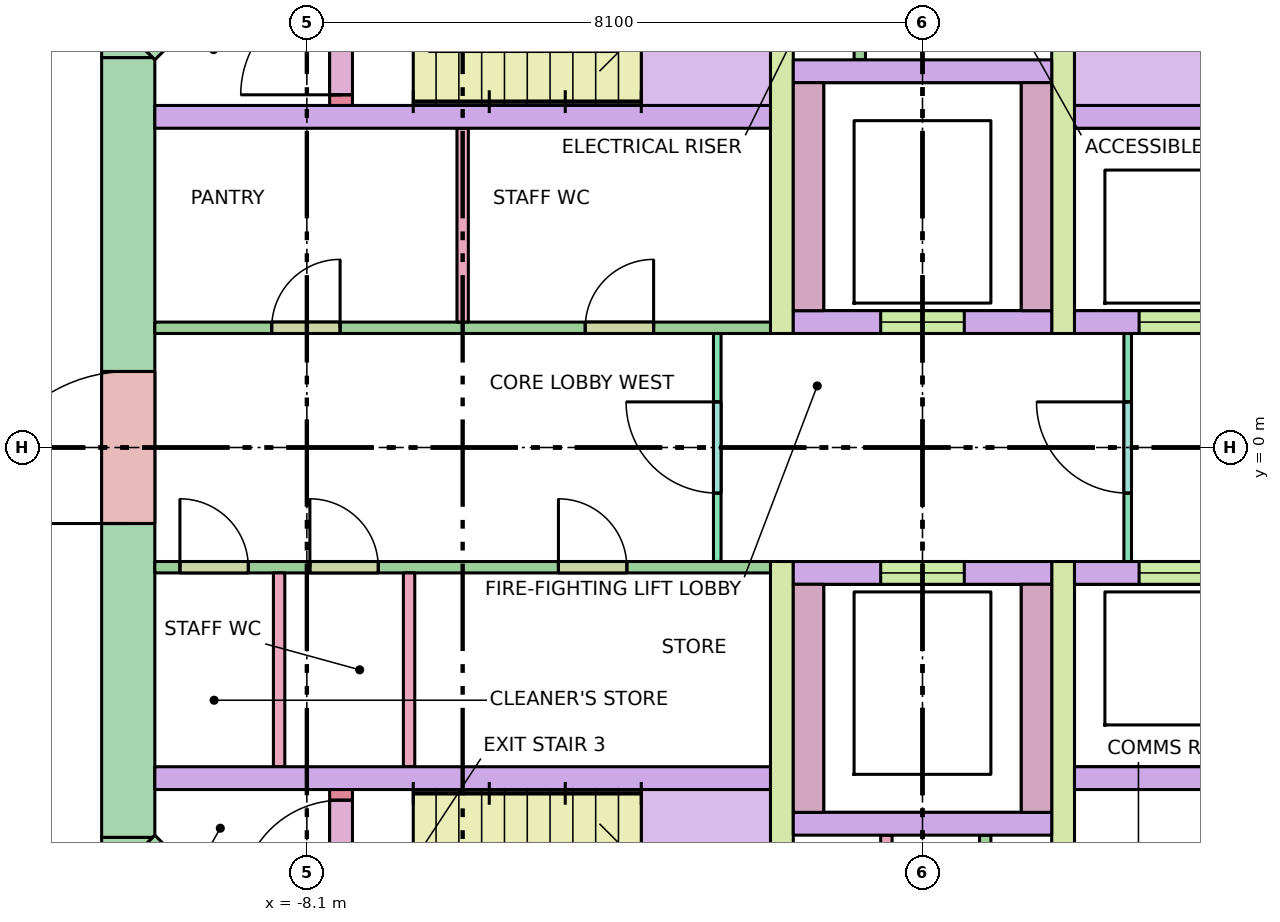
"""IFC4 building model, lengths in metres.
Left out: names, types, materials, properties, quantities, classifications, styles, units other than length and angle.
Written with IfcOpenShell. Run it as: python <this file> out.ifc"""

import sys

from ifc_helpers import new_model, si_unit, direction, frame, frame_2d, origin, place, context, subcontext, project, spatial, polyline, rectangle, outline, extrude, element, fill, save


model = new_model("IFC4")
c1 = context("Model", 3, precision=1e-05, world=origin(), true_north=direction((0.0, 1.0)))
c2 = subcontext(c1, "Body", "Model", "MODEL_VIEW")
j1 = project(units=[si_unit("LENGTHUNIT", "METRE"), si_unit("PLANEANGLEUNIT", "RADIAN")], contexts=[c1])
p1 = place(None, origin())
s1 = spatial("IfcSite", under=j1, at=p1, CompositionType="ELEMENT")
p2 = place(p1, origin())
s2 = spatial("IfcBuilding", under=s1, at=p2, CompositionType="ELEMENT")
p3 = place(p2, frame((0.0, 0.0, 211.3)))
s3 = spatial("IfcBuildingStorey", under=s2, at=p3, CompositionType="ELEMENT", Elevation=211.3)
p4 = place(p3, frame((-10.45, -5.13, -0.28), z_axis=(0.0, 0.0, 1.0), x_axis=(0.0, 1.0, 0.0)))
e1 = element("IfcWall", 1, at=p4, inside=s3, PredefinedType="SHEAR", context=c2, shape_type="SweptSolid", body=[
    extrude(rectangle(XDim=10.26, YDim=0.7, at=frame_2d((5.13, 0.0))), origin(), (0.0, 0.0, 1.0), 3.7),
])
p5 = place(p4, frame((4.13, 0.0, 0.28)))
e2 = element("IfcOpeningElement", 2, at=p5, cuts=e1, PredefinedType="OPENING", context=c2, shape_type="SweptSolid", body=[
    extrude(rectangle(XDim=2.0, YDim=2.1, at=frame_2d((1.0, 1.05))), frame((0.0, 0.36, 0.0), z_axis=(0.0, -1.0, 0.0), x_axis=(1.0, 0.0, 0.0)), (0.0, 0.0, 1.0), 0.72),
])
p6 = place(p3, frame((-10.347, 5.347, -0.28), z_axis=(0.0, 0.0, 1.0), x_axis=(0.707106781187, 0.707106781187, 0.0)))
e3 = element("IfcWall", 3, at=p6, inside=s3, PredefinedType="SHEAR", context=c2, shape_type="SweptSolid", body=[
    extrude(rectangle(XDim=4.243, YDim=0.7, at=frame_2d((2.121, 0.0))), origin(), (0.0, 0.0, 1.0), 3.7),
])
p7 = place(p6, frame((0.65, 0.0, 0.28)))
e4 = element("IfcOpeningElement", 4, at=p7, cuts=e3, PredefinedType="OPENING", context=c2, shape_type="SweptSolid", body=[
    extrude(rectangle(XDim=1.2, YDim=2.1, at=frame_2d((0.6, 1.05))), frame((0.0, 0.36, 0.0), z_axis=(0.0, -1.0, 0.0), x_axis=(1.0, 0.0, 0.0)), (0.0, 0.0, 1.0), 0.72),
])
p8 = place(p3, frame((-7.347, -8.347, -0.28), z_axis=(0.0, 0.0, 1.0), x_axis=(-0.707106781187, 0.707106781187, 0.0)))
e5 = element("IfcWall", 5, at=p8, inside=s3, PredefinedType="SHEAR", context=c2, shape_type="SweptSolid", body=[
    extrude(rectangle(XDim=4.243, YDim=0.7, at=frame_2d((2.121, 0.0))), origin(), (0.0, 0.0, 1.0), 3.7),
])
p9 = place(p8, frame((2.393, 0.0, 0.28)))
e6 = element("IfcOpeningElement", 6, at=p9, cuts=e5, PredefinedType="OPENING", context=c2, shape_type="SweptSolid", body=[
    extrude(rectangle(XDim=1.2, YDim=2.1, at=frame_2d((0.6, 1.05))), frame((0.0, 0.36, 0.0), z_axis=(0.0, -1.0, 0.0), x_axis=(1.0, 0.0, 0.0)), (0.0, 0.0, 1.0), 0.72),
])
p10 = place(p3, frame((0.0, 0.0, -0.28)))
e7 = element("IfcWall", 7, at=p10, inside=s3, PredefinedType="SHEAR", context=c2, shape_type="SweptSolid", body=[
    extrude(outline(polyline([(-10.8, -5.39), (-10.8, -5.13), (-10.8, -5.13), (-10.13, -5.13), (-10.595, -5.595), (-10.595, -5.595), (-10.595, -5.595), (-10.8, -5.39)])), origin(), (0.0, 0.0, 1.0), 3.7),
])
p11 = place(p3, frame((0.0, 0.0, -0.28)))
e8 = element("IfcWall", 8, at=p11, inside=s3, PredefinedType="SHEAR", context=c2, shape_type="SweptSolid", body=[
    extrude(outline(polyline([(-10.595, 5.595), (-10.595, 5.595), (-10.595, 5.595), (-10.13, 5.13), (-10.8, 5.13), (-10.8, 5.13), (-10.8, 5.39), (-10.595, 5.595)])), origin(), (0.0, 0.0, 1.0), 3.7),
])
for number, where, z_axis, x_axis in (
    (9, (-10.1, 4.35, 0.0), (0.0, 0.0, 1.0), (1.0, 0.0, 0.0)),
    (10, (-10.1, -4.35, 0.0), (0.0, 0.0, 1.0), (1.0, 0.0, 0.0)),
    (11, (2.0, 4.35, 0.0), (0.0, 0.0, 1.0), (1.0, 0.0, 0.0)),
    (12, (2.0, -4.35, 0.0), (0.0, 0.0, 1.0), (1.0, 0.0, 0.0)),
):
    element("IfcWall", number, at=place(p3, frame(where, z_axis=z_axis, x_axis=x_axis)), inside=s3, PredefinedType="SOLIDWALL", context=c2, shape_type="SweptSolid", body=[
        extrude(rectangle(XDim=8.1, YDim=0.3, at=frame_2d((4.05, 0.0))), origin(), (0.0, 0.0, 1.0), 3.42),
    ])
p12 = place(p3, frame((2.0, 1.65, 0.0), z_axis=(0.0, 0.0, 1.0), x_axis=(1.0, 0.0, 0.0)))
e13 = element("IfcWall", 13, at=p12, inside=s3, PredefinedType="SOLIDWALL", context=c2, shape_type="SweptSolid", body=[
    extrude(rectangle(XDim=8.1, YDim=0.3, at=frame_2d((4.05, 0.0))), origin(), (0.0, 0.0, 1.0), 3.42),
])
p13 = place(p12, frame((0.85, 0.0, 0.0)))
e14 = element("IfcOpeningElement", 14, at=p13, cuts=e13, PredefinedType="OPENING", context=c2, shape_type="SweptSolid", body=[
    extrude(rectangle(XDim=1.1, YDim=2.1, at=frame_2d((0.55, 1.05))), frame((0.0, 0.16, 0.0), z_axis=(0.0, -1.0, 0.0), x_axis=(1.0, 0.0, 0.0)), (0.0, 0.0, 1.0), 0.32),
])
p14 = place(p12, frame((3.5, 0.0, 0.0)))
e15 = element("IfcOpeningElement", 15, at=p14, cuts=e13, PredefinedType="OPENING", context=c2, shape_type="SweptSolid", body=[
    extrude(rectangle(XDim=1.1, YDim=2.1, at=frame_2d((0.55, 1.05))), frame((0.0, 0.16, 0.0), z_axis=(0.0, -1.0, 0.0), x_axis=(1.0, 0.0, 0.0)), (0.0, 0.0, 1.0), 0.32),
])
p15 = place(p12, frame((6.3, 0.0, 0.0)))
e16 = element("IfcOpeningElement", 16, at=p15, cuts=e13, PredefinedType="OPENING", context=c2, shape_type="SweptSolid", body=[
    extrude(rectangle(XDim=1.1, YDim=2.1, at=frame_2d((0.55, 1.05))), frame((0.0, 0.16, 0.0), z_axis=(0.0, -1.0, 0.0), x_axis=(1.0, 0.0, 0.0)), (0.0, 0.0, 1.0), 0.32),
])
p16 = place(p3, frame((2.0, -1.65, 0.0), z_axis=(0.0, 0.0, 1.0), x_axis=(1.0, 0.0, 0.0)))
e17 = element("IfcWall", 17, at=p16, inside=s3, PredefinedType="SOLIDWALL", context=c2, shape_type="SweptSolid", body=[
    extrude(rectangle(XDim=8.1, YDim=0.3, at=frame_2d((4.05, 0.0))), origin(), (0.0, 0.0, 1.0), 3.42),
])
p17 = place(p16, frame((0.85, 0.0, 0.0)))
e18 = element("IfcOpeningElement", 18, at=p17, cuts=e17, PredefinedType="OPENING", context=c2, shape_type="SweptSolid", body=[
    extrude(rectangle(XDim=1.1, YDim=2.1, at=frame_2d((0.55, 1.05))), frame((0.0, 0.16, 0.0), z_axis=(0.0, -1.0, 0.0), x_axis=(1.0, 0.0, 0.0)), (0.0, 0.0, 1.0), 0.32),
])
p18 = place(p16, frame((3.5, 0.0, 0.0)))
e19 = element("IfcOpeningElement", 19, at=p18, cuts=e17, PredefinedType="OPENING", context=c2, shape_type="SweptSolid", body=[
    extrude(rectangle(XDim=1.1, YDim=2.1, at=frame_2d((0.55, 1.05))), frame((0.0, 0.16, 0.0), z_axis=(0.0, -1.0, 0.0), x_axis=(1.0, 0.0, 0.0)), (0.0, 0.0, 1.0), 0.32),
])
p19 = place(p16, frame((6.3, 0.0, 0.0)))
e20 = element("IfcOpeningElement", 20, at=p19, cuts=e17, PredefinedType="OPENING", context=c2, shape_type="SweptSolid", body=[
    extrude(rectangle(XDim=1.1, YDim=2.1, at=frame_2d((0.55, 1.05))), frame((0.0, 0.16, 0.0), z_axis=(0.0, -1.0, 0.0), x_axis=(1.0, 0.0, 0.0)), (0.0, 0.0, 1.0), 0.32),
])
for number, where, z_axis, x_axis in (
    (21, (-1.85, 1.5, 0.0), (0.0, 0.0, 1.0), (0.0, 1.0, 0.0)),
    (22, (-1.85, -8.1, 0.0), (0.0, 0.0, 1.0), (0.0, 1.0, 0.0)),
    (23, (1.85, 1.5, 0.0), (0.0, 0.0, 1.0), (0.0, 1.0, 0.0)),
    (24, (1.85, -8.1, 0.0), (0.0, 0.0, 1.0), (0.0, 1.0, 0.0)),
):
    element("IfcWall", number, at=place(p3, frame(where, z_axis=z_axis, x_axis=x_axis)), inside=s3, PredefinedType="SHEAR", context=c2, shape_type="SweptSolid", body=[
        extrude(rectangle(XDim=6.6, YDim=0.3, at=frame_2d((3.3, 0.0))), origin(), (0.0, 0.0, 1.0), 3.42),
    ])
p20 = place(p3, frame((-1.7, 1.65, 0.0), z_axis=(0.0, 0.0, 1.0), x_axis=(1.0, 0.0, 0.0)))
e25 = element("IfcWall", 25, at=p20, inside=s3, PredefinedType="SOLIDWALL", context=c2, shape_type="SweptSolid", body=[
    extrude(rectangle(XDim=3.4, YDim=0.3, at=frame_2d((1.7, 0.0))), origin(), (0.0, 0.0, 1.0), 3.42),
])
p21 = place(p20, frame((1.15, 0.0, 0.0)))
e26 = element("IfcOpeningElement", 26, at=p21, cuts=e25, PredefinedType="OPENING", context=c2, shape_type="SweptSolid", body=[
    extrude(rectangle(XDim=1.1, YDim=2.1, at=frame_2d((0.55, 1.05))), frame((0.0, 0.16, 0.0), z_axis=(0.0, -1.0, 0.0), x_axis=(1.0, 0.0, 0.0)), (0.0, 0.0, 1.0), 0.32),
])
p22 = place(p3, frame((-1.7, -1.65, 0.0), z_axis=(0.0, 0.0, 1.0), x_axis=(1.0, 0.0, 0.0)))
e27 = element("IfcWall", 27, at=p22, inside=s3, PredefinedType="SOLIDWALL", context=c2, shape_type="SweptSolid", body=[
    extrude(rectangle(XDim=3.4, YDim=0.3, at=frame_2d((1.7, 0.0))), origin(), (0.0, 0.0, 1.0), 3.42),
])
p23 = place(p22, frame((1.15, 0.0, 0.0)))
e28 = element("IfcOpeningElement", 28, at=p23, cuts=e27, PredefinedType="OPENING", context=c2, shape_type="SweptSolid", body=[
    extrude(rectangle(XDim=1.1, YDim=2.1, at=frame_2d((0.55, 1.05))), frame((0.0, 0.16, 0.0), z_axis=(0.0, -1.0, 0.0), x_axis=(1.0, 0.0, 0.0)), (0.0, 0.0, 1.0), 0.32),
])
for number, where, z_axis, x_axis in (
    (29, (-1.5, 1.8, 0.0), (0.0, 0.0, 1.0), (0.0, 1.0, 0.0)),
    (30, (-1.5, -4.8, 0.0), (0.0, 0.0, 1.0), (0.0, 1.0, 0.0)),
    (31, (1.5, 1.8, 0.0), (0.0, 0.0, 1.0), (0.0, 1.0, 0.0)),
    (32, (1.5, -4.8, 0.0), (0.0, 0.0, 1.0), (0.0, 1.0, 0.0)),
):
    element("IfcWall", number, at=place(p3, frame(where, z_axis=z_axis, x_axis=x_axis)), inside=s3, PredefinedType="SOLIDWALL", context=c2, shape_type="SweptSolid", body=[
        extrude(rectangle(XDim=3.0, YDim=0.4, at=frame_2d((1.5, 0.0))), origin(), (0.0, 0.0, 1.0), 3.42),
    ])
for number, where, z_axis, x_axis in (
    (33, (-1.7, 4.95, 0.0), (0.0, 0.0, 1.0), (1.0, 0.0, 0.0)),
    (34, (-1.7, -4.95, 0.0), (0.0, 0.0, 1.0), (1.0, 0.0, 0.0)),
):
    element("IfcWall", number, at=place(p3, frame(where, z_axis=z_axis, x_axis=x_axis)), inside=s3, PredefinedType="SOLIDWALL", context=c2, shape_type="SweptSolid", body=[
        extrude(rectangle(XDim=3.4, YDim=0.3, at=frame_2d((1.7, 0.0))), origin(), (0.0, 0.0, 1.0), 3.42),
    ])
p24 = place(p3, frame((-7.65, 4.5, 0.0), z_axis=(0.0, 0.0, 1.0), x_axis=(0.0, 1.0, 0.0)))
e35 = element("IfcWall", 35, at=p24, inside=s3, PredefinedType="SHEAR", context=c2, shape_type="SweptSolid", body=[
    extrude(rectangle(XDim=3.14, YDim=0.3, at=frame_2d((1.57, 0.0))), origin(), (0.0, 0.0, 1.0), 3.42),
])
p25 = place(p24, frame((0.14, 0.0, 0.0)))
e36 = element("IfcOpeningElement", 36, at=p25, cuts=e35, PredefinedType="OPENING", context=c2, shape_type="SweptSolid", body=[
    extrude(rectangle(XDim=1.32, YDim=2.1, at=frame_2d((0.66, 1.05))), frame((0.0, 0.16, 0.0), z_axis=(0.0, -1.0, 0.0), x_axis=(1.0, 0.0, 0.0)), (0.0, 0.0, 1.0), 0.32),
])
p26 = place(p3, frame((-7.65, -7.64, 0.0), z_axis=(0.0, 0.0, 1.0), x_axis=(0.0, 1.0, 0.0)))
e37 = element("IfcWall", 37, at=p26, inside=s3, PredefinedType="SHEAR", context=c2, shape_type="SweptSolid", body=[
    extrude(rectangle(XDim=3.14, YDim=0.3, at=frame_2d((1.57, 0.0))), origin(), (0.0, 0.0, 1.0), 3.42),
])
p27 = place(p26, frame((1.68, 0.0, 0.0)))
e38 = element("IfcOpeningElement", 38, at=p27, cuts=e37, PredefinedType="OPENING", context=c2, shape_type="SweptSolid", body=[
    extrude(rectangle(XDim=1.32, YDim=2.1, at=frame_2d((0.66, 1.05))), frame((0.0, 0.16, 0.0), z_axis=(0.0, -1.0, 0.0), x_axis=(1.0, 0.0, 0.0)), (0.0, 0.0, 1.0), 0.32),
])
p28 = place(p3, frame((-2.7, -1.5, 0.0), z_axis=(0.0, 0.0, 1.0), x_axis=(0.0, 1.0, 0.0)))
e39 = element("IfcWall", 39, at=p28, inside=s3, PredefinedType="PARTITIONING", context=c2, shape_type="SweptSolid", body=[
    extrude(rectangle(XDim=3.0, YDim=0.1, at=frame_2d((1.5, 0.0))), origin(), (0.0, 0.0, 1.0), 3.42),
])
p29 = place(p28, frame((0.9, 0.0, 0.0)))
e40 = element("IfcOpeningElement", 40, at=p29, cuts=e39, PredefinedType="OPENING", context=c2, shape_type="SweptSolid", body=[
    extrude(rectangle(XDim=1.2, YDim=2.1, at=frame_2d((0.6, 1.05))), frame((0.0, 0.06, 0.0), z_axis=(0.0, -1.0, 0.0), x_axis=(1.0, 0.0, 0.0)), (0.0, 0.0, 1.0), 0.12),
])
p30 = place(p3, frame((2.7, -1.5, 0.0), z_axis=(0.0, 0.0, 1.0), x_axis=(0.0, 1.0, 0.0)))
e41 = element("IfcWall", 41, at=p30, inside=s3, PredefinedType="PARTITIONING", context=c2, shape_type="SweptSolid", body=[
    extrude(rectangle(XDim=3.0, YDim=0.1, at=frame_2d((1.5, 0.0))), origin(), (0.0, 0.0, 1.0), 3.42),
])
p31 = place(p30, frame((0.9, 0.0, 0.0)))
e42 = element("IfcOpeningElement", 42, at=p31, cuts=e41, PredefinedType="OPENING", context=c2, shape_type="SweptSolid", body=[
    extrude(rectangle(XDim=1.2, YDim=2.1, at=frame_2d((0.6, 1.05))), frame((0.0, 0.06, 0.0), z_axis=(0.0, -1.0, 0.0), x_axis=(1.0, 0.0, 0.0)), (0.0, 0.0, 1.0), 0.12),
])
for number, where, z_axis, x_axis in (
    (43, (-0.825, 5.1, 0.0), (0.0, 0.0, 1.0), (0.0, 1.0, 0.0)),
    (44, (0.825, -8.1, 0.0), (0.0, 0.0, 1.0), (0.0, 1.0, 0.0)),
    (45, (-0.475, -8.1, 0.0), (0.0, 0.0, 1.0), (0.0, 1.0, 0.0)),
):
    element("IfcWall", number, at=place(p3, frame(where, z_axis=z_axis, x_axis=x_axis)), inside=s3, PredefinedType="PARTITIONING", context=c2, shape_type="SweptSolid", body=[
        extrude(rectangle(XDim=3.0, YDim=0.15, at=frame_2d((1.5, 0.0))), origin(), (0.0, 0.0, 1.0), 3.42),
    ])
for number, where, z_axis, x_axis in (
    (46, (-6.05, 1.65, 0.0), (0.0, 0.0, 1.0), (0.0, 1.0, 0.0)),
    (47, (-8.465, -4.2, 0.0), (0.0, 0.0, 1.0), (0.0, 1.0, 0.0)),
    (48, (-6.755, -4.2, 0.0), (0.0, 0.0, 1.0), (0.0, 1.0, 0.0)),
):
    element("IfcWall", number, at=place(p3, frame(where, z_axis=z_axis, x_axis=x_axis)), inside=s3, PredefinedType="PARTITIONING", context=c2, shape_type="SweptSolid", body=[
        extrude(rectangle(XDim=2.55, YDim=0.15, at=frame_2d((1.275, 0.0))), origin(), (0.0, 0.0, 1.0), 3.42),
    ])
p32 = place(p3, frame((-10.1, 1.575, 0.0), z_axis=(0.0, 0.0, 1.0), x_axis=(1.0, 0.0, 0.0)))
e49 = element("IfcWall", 49, at=p32, inside=s3, PredefinedType="PARTITIONING", context=c2, shape_type="SweptSolid", body=[
    extrude(rectangle(XDim=8.1, YDim=0.15, at=frame_2d((4.05, 0.0))), origin(), (0.0, 0.0, 1.0), 3.42),
])
p33 = place(p32, frame((1.538, 0.0, 0.0)))
e50 = element("IfcOpeningElement", 50, at=p33, cuts=e49, PredefinedType="OPENING", context=c2, shape_type="SweptSolid", body=[
    extrude(rectangle(XDim=0.9, YDim=2.1, at=frame_2d((0.45, 1.05))), frame((0.0, 0.085, 0.0), z_axis=(0.0, -1.0, 0.0), x_axis=(1.0, 0.0, 0.0)), (0.0, 0.0, 1.0), 0.17),
])
p34 = place(p32, frame((5.663, 0.0, 0.0)))
e51 = element("IfcOpeningElement", 51, at=p34, cuts=e49, PredefinedType="OPENING", context=c2, shape_type="SweptSolid", body=[
    extrude(rectangle(XDim=0.9, YDim=2.1, at=frame_2d((0.45, 1.05))), frame((0.0, 0.085, 0.0), z_axis=(0.0, -1.0, 0.0), x_axis=(1.0, 0.0, 0.0)), (0.0, 0.0, 1.0), 0.17),
])
p35 = place(p3, frame((-10.1, -1.575, 0.0), z_axis=(0.0, 0.0, 1.0), x_axis=(1.0, 0.0, 0.0)))
e52 = element("IfcWall", 52, at=p35, inside=s3, PredefinedType="PARTITIONING", context=c2, shape_type="SweptSolid", body=[
    extrude(rectangle(XDim=8.1, YDim=0.15, at=frame_2d((4.05, 0.0))), origin(), (0.0, 0.0, 1.0), 3.42),
])
p36 = place(p35, frame((0.33, 0.0, 0.0)))
e53 = element("IfcOpeningElement", 53, at=p36, cuts=e52, PredefinedType="OPENING", context=c2, shape_type="SweptSolid", body=[
    extrude(rectangle(XDim=0.9, YDim=2.1, at=frame_2d((0.45, 1.05))), frame((0.0, 0.085, 0.0), z_axis=(0.0, -1.0, 0.0), x_axis=(1.0, 0.0, 0.0)), (0.0, 0.0, 1.0), 0.17),
])
p37 = place(p35, frame((2.04, 0.0, 0.0)))
e54 = element("IfcOpeningElement", 54, at=p37, cuts=e52, PredefinedType="OPENING", context=c2, shape_type="SweptSolid", body=[
    extrude(rectangle(XDim=0.9, YDim=2.1, at=frame_2d((0.45, 1.05))), frame((0.0, 0.085, 0.0), z_axis=(0.0, -1.0, 0.0), x_axis=(1.0, 0.0, 0.0)), (0.0, 0.0, 1.0), 0.17),
])
p38 = place(p35, frame((5.31, 0.0, 0.0)))
e55 = element("IfcOpeningElement", 55, at=p38, cuts=e52, PredefinedType="OPENING", context=c2, shape_type="SweptSolid", body=[
    extrude(rectangle(XDim=0.9, YDim=2.1, at=frame_2d((0.45, 1.05))), frame((0.0, 0.085, 0.0), z_axis=(0.0, -1.0, 0.0), x_axis=(1.0, 0.0, 0.0)), (0.0, 0.0, 1.0), 0.17),
])
p39 = place(p13, origin())
e56 = element("IfcDoor", 56, at=p39, inside=s3, OperationType="DOUBLE_DOOR_SLIDING", PredefinedType="DOOR", context=c2, shape_type="SweptSolid", body=[
    extrude(rectangle(XDim=1.1, YDim=2.1, at=frame_2d((0.55, 1.05))), frame((0.0, 0.025, 0.0), z_axis=(0.0, -1.0, 0.0), x_axis=(1.0, 0.0, 0.0)), (0.0, 0.0, 1.0), 0.05),
])
fill(e14, e56)
p40 = place(p17, origin())
e57 = element("IfcDoor", 57, at=p40, inside=s3, OperationType="DOUBLE_DOOR_SLIDING", PredefinedType="DOOR", context=c2, shape_type="SweptSolid", body=[
    extrude(rectangle(XDim=1.1, YDim=2.1, at=frame_2d((0.55, 1.05))), frame((0.0, 0.025, 0.0), z_axis=(0.0, -1.0, 0.0), x_axis=(1.0, 0.0, 0.0)), (0.0, 0.0, 1.0), 0.05),
])
fill(e18, e57)
p41 = place(p21, origin())
e58 = element("IfcDoor", 58, at=p41, inside=s3, OperationType="DOUBLE_DOOR_SLIDING", PredefinedType="DOOR", context=c2, shape_type="SweptSolid", body=[
    extrude(rectangle(XDim=1.1, YDim=2.1, at=frame_2d((0.55, 1.05))), frame((0.0, 0.025, 0.0), z_axis=(0.0, -1.0, 0.0), x_axis=(1.0, 0.0, 0.0)), (0.0, 0.0, 1.0), 0.05),
])
fill(e26, e58)
p42 = place(p23, origin())
e59 = element("IfcDoor", 59, at=p42, inside=s3, OperationType="DOUBLE_DOOR_SLIDING", PredefinedType="DOOR", context=c2, shape_type="SweptSolid", body=[
    extrude(rectangle(XDim=1.1, YDim=2.1, at=frame_2d((0.55, 1.05))), frame((0.0, 0.025, 0.0), z_axis=(0.0, -1.0, 0.0), x_axis=(1.0, 0.0, 0.0)), (0.0, 0.0, 1.0), 0.05),
])
fill(e28, e59)
p43 = place(p25, origin())
e60 = element("IfcDoor", 60, at=p43, inside=s3, OperationType="DOUBLE_DOOR_SINGLE_SWING", PredefinedType="DOOR", context=c2, shape_type="SweptSolid", body=[
    extrude(rectangle(XDim=1.32, YDim=2.1, at=frame_2d((0.66, 1.05))), frame((0.0, 0.025, 0.0), z_axis=(0.0, -1.0, 0.0), x_axis=(1.0, 0.0, 0.0)), (0.0, 0.0, 1.0), 0.05),
])
fill(e36, e60)
p44 = place(p27, origin())
e61 = element("IfcDoor", 61, at=p44, inside=s3, OperationType="DOUBLE_DOOR_SINGLE_SWING", PredefinedType="DOOR", context=c2, shape_type="SweptSolid", body=[
    extrude(rectangle(XDim=1.32, YDim=2.1, at=frame_2d((0.66, 1.05))), frame((0.0, 0.025, 0.0), z_axis=(0.0, -1.0, 0.0), x_axis=(1.0, 0.0, 0.0)), (0.0, 0.0, 1.0), 0.05),
])
fill(e38, e61)
p45 = place(p5, origin())
e62 = element("IfcDoor", 62, at=p45, inside=s3, OperationType="DOUBLE_DOOR_SINGLE_SWING", PredefinedType="DOOR", context=c2, shape_type="SweptSolid", body=[
    extrude(rectangle(XDim=2.0, YDim=2.1, at=frame_2d((1.0, 1.05))), frame((0.0, 0.025, 0.0), z_axis=(0.0, -1.0, 0.0), x_axis=(1.0, 0.0, 0.0)), (0.0, 0.0, 1.0), 0.05),
])
fill(e2, e62)
p46 = place(p29, origin())
e63 = element("IfcDoor", 63, at=p46, inside=s3, OperationType="SINGLE_SWING_RIGHT", PredefinedType="DOOR", context=c2, shape_type="SweptSolid", body=[
    extrude(rectangle(XDim=1.2, YDim=2.1, at=frame_2d((0.6, 1.05))), frame((0.0, 0.025, 0.0), z_axis=(0.0, -1.0, 0.0), x_axis=(1.0, 0.0, 0.0)), (0.0, 0.0, 1.0), 0.05),
])
fill(e40, e63)
p47 = place(p31, origin())
e64 = element("IfcDoor", 64, at=p47, inside=s3, OperationType="SINGLE_SWING_RIGHT", PredefinedType="DOOR", context=c2, shape_type="SweptSolid", body=[
    extrude(rectangle(XDim=1.2, YDim=2.1, at=frame_2d((0.6, 1.05))), frame((0.0, 0.025, 0.0), z_axis=(0.0, -1.0, 0.0), x_axis=(1.0, 0.0, 0.0)), (0.0, 0.0, 1.0), 0.05),
])
fill(e42, e64)
p48 = place(p33, origin())
e65 = element("IfcDoor", 65, at=p48, inside=s3, OperationType="SINGLE_SWING_RIGHT", PredefinedType="DOOR", context=c2, shape_type="SweptSolid", body=[
    extrude(rectangle(XDim=0.9, YDim=2.1, at=frame_2d((0.45, 1.05))), frame((0.0, 0.025, 0.0), z_axis=(0.0, -1.0, 0.0), x_axis=(1.0, 0.0, 0.0)), (0.0, 0.0, 1.0), 0.05),
])
fill(e50, e65)
p49 = place(p34, origin())
e66 = element("IfcDoor", 66, at=p49, inside=s3, OperationType="SINGLE_SWING_RIGHT", PredefinedType="DOOR", context=c2, shape_type="SweptSolid", body=[
    extrude(rectangle(XDim=0.9, YDim=2.1, at=frame_2d((0.45, 1.05))), frame((0.0, 0.025, 0.0), z_axis=(0.0, -1.0, 0.0), x_axis=(1.0, 0.0, 0.0)), (0.0, 0.0, 1.0), 0.05),
])
fill(e51, e66)
p50 = place(p36, origin())
e67 = element("IfcDoor", 67, at=p50, inside=s3, OperationType="SINGLE_SWING_LEFT", PredefinedType="DOOR", context=c2, shape_type="SweptSolid", body=[
    extrude(rectangle(XDim=0.9, YDim=2.1, at=frame_2d((0.45, 1.05))), frame((0.0, 0.025, 0.0), z_axis=(0.0, -1.0, 0.0), x_axis=(1.0, 0.0, 0.0)), (0.0, 0.0, 1.0), 0.05),
])
fill(e53, e67)
p51 = place(p37, origin())
e68 = element("IfcDoor", 68, at=p51, inside=s3, OperationType="SINGLE_SWING_LEFT", PredefinedType="DOOR", context=c2, shape_type="SweptSolid", body=[
    extrude(rectangle(XDim=0.9, YDim=2.1, at=frame_2d((0.45, 1.05))), frame((0.0, 0.025, 0.0), z_axis=(0.0, -1.0, 0.0), x_axis=(1.0, 0.0, 0.0)), (0.0, 0.0, 1.0), 0.05),
])
fill(e54, e68)
p52 = place(p38, origin())
e69 = element("IfcDoor", 69, at=p52, inside=s3, OperationType="SINGLE_SWING_LEFT", PredefinedType="DOOR", context=c2, shape_type="SweptSolid", body=[
    extrude(rectangle(XDim=0.9, YDim=2.1, at=frame_2d((0.45, 1.05))), frame((0.0, 0.025, 0.0), z_axis=(0.0, -1.0, 0.0), x_axis=(1.0, 0.0, 0.0)), (0.0, 0.0, 1.0), 0.05),
])
fill(e55, e69)
save(model, sys.argv[1])
